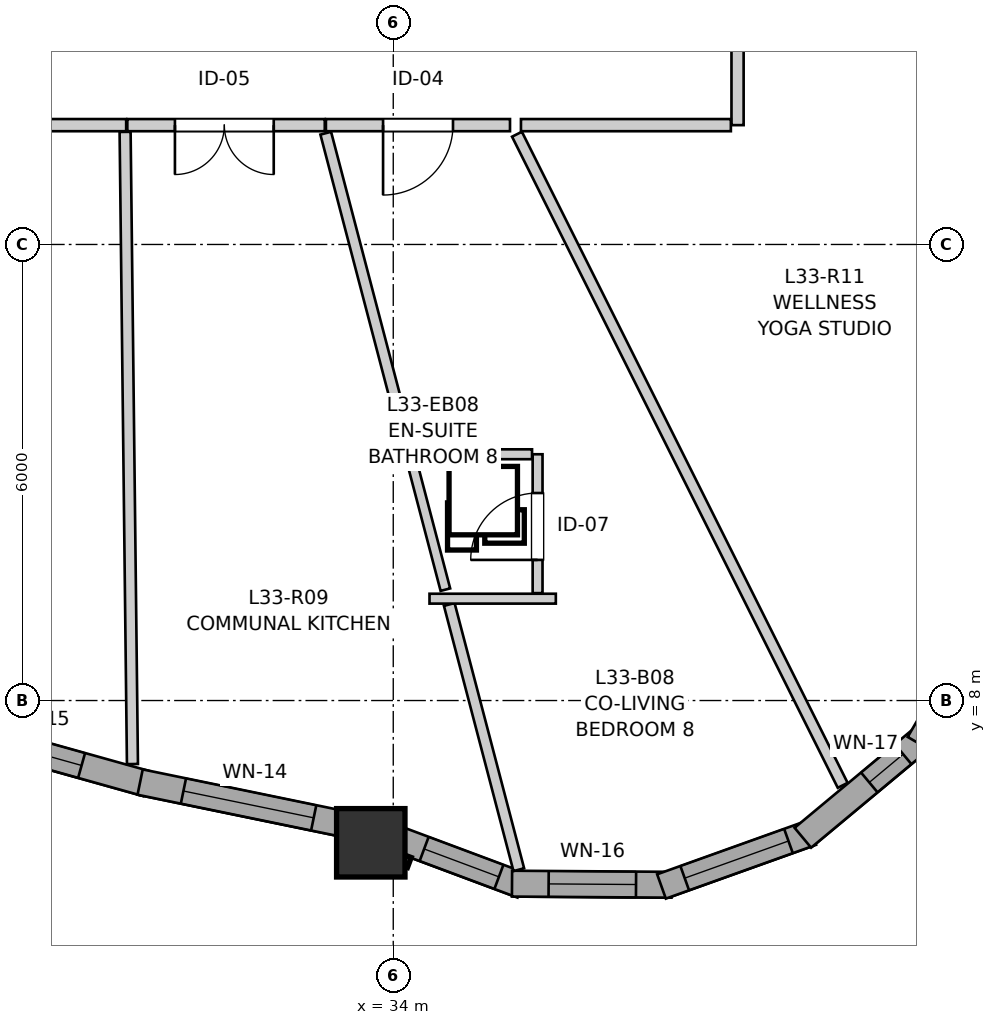
"""IFC4 building model, lengths in metres.
Left out: names, types, materials, properties, quantities, classifications, styles, units other than length and angle.
Written with IfcOpenShell. Run it as: python <this file> out.ifc"""

import sys

from ifc_helpers import new_model, si_unit, direction, frame, frame_2d, origin, origin_2d, place, context, subcontext, project, spatial, rectangle, extrude, source, transform, mapped, element, fill, save


model = new_model("IFC4")
c1 = context("Model", 3, precision=1e-05, world=origin(), true_north=direction((0.0, 1.0)))
c2 = subcontext(c1, "Body", "Model", "MODEL_VIEW")
j1 = project(units=[si_unit("LENGTHUNIT", "METRE"), si_unit("PLANEANGLEUNIT", "RADIAN")], contexts=[c1])
p1 = place(None, origin())
s1 = spatial("IfcSite", under=j1, at=p1, CompositionType="ELEMENT")
p2 = place(p1, origin())
s2 = spatial("IfcBuilding", under=s1, at=p2, CompositionType="ELEMENT")
p3 = place(p2, frame((0.0, 0.0, 112.0)))
s3 = spatial("IfcBuildingStorey", under=s2, at=p3, CompositionType="ELEMENT", Elevation=112.0)
m1 = source(origin(), c2, "Body", "SweptSolid", [
    extrude(rectangle(XDim=0.9, YDim=0.9, at=origin_2d()), origin(), (0.0, 0.0, 1.0), 2.935),
])
p4 = place(p3, frame((33.704, 6.128, 0.0), z_axis=(0.0, 0.0, 1.0), x_axis=(1.0, 0.0, 0.0)))
e1 = element("IfcColumn", 1, at=p4, inside=s3, PredefinedType="COLUMN", context=c2, shape_type="MappedRepresentation", body=[
    mapped(m1, transform((0.0, 0.0, 0.0), x_axis=(1.0, 0.0, 0.0), y_axis=(0.0, 1.0, 0.0), z_axis=(0.0, 0.0, 1.0), scale=1.0)),
])
p5 = place(p3, frame((27.819, 7.728, 0.0), z_axis=(0.0, 0.0, 1.0), x_axis=(0.963032186905, -0.269386352632, 0.0)))
e2 = element("IfcWall", 2, at=p5, inside=s3, PredefinedType="SOLIDWALL", context=c2, shape_type="SweptSolid", body=[
    extrude(rectangle(XDim=3.049, YDim=0.34, at=frame_2d((1.524, 0.0))), origin(), (0.0, 0.0, 1.0), 2.465),
])
p6 = place(p5, frame((0.71, 0.0, 0.82)))
e3 = element("IfcOpeningElement", 3, at=p6, cuts=e2, PredefinedType="OPENING", context=c2, shape_type="SweptSolid", body=[
    extrude(rectangle(XDim=1.45, YDim=1.25, at=frame_2d((0.725, 0.625))), frame((0.0, 0.18, 0.0), z_axis=(0.0, -1.0, 0.0), x_axis=(1.0, 0.0, 0.0)), (0.0, 0.0, 1.0), 0.36),
])
p7 = place(p3, frame((30.67, 6.927, 0.0), z_axis=(0.0, 0.0, 1.0), x_axis=(0.979422345081, -0.201821381317, 0.0)))
e4 = element("IfcWall", 4, at=p7, inside=s3, PredefinedType="SOLIDWALL", context=c2, shape_type="SweptSolid", body=[
    extrude(rectangle(XDim=2.903, YDim=0.34, at=frame_2d((1.452, 0.0))), origin(), (0.0, 0.0, 1.0), 2.465),
])
p8 = place(p7, frame((0.582, 0.0, 0.82)))
e5 = element("IfcOpeningElement", 5, at=p8, cuts=e4, PredefinedType="OPENING", context=c2, shape_type="SweptSolid", body=[
    extrude(rectangle(XDim=1.75, YDim=1.3, at=frame_2d((0.875, 0.65))), frame((0.0, 0.18, 0.0), z_axis=(0.0, -1.0, 0.0), x_axis=(1.0, 0.0, 0.0)), (0.0, 0.0, 1.0), 0.36),
])
p9 = place(p3, frame((33.979, 6.207, 0.0), z_axis=(0.0, 0.0, 1.0), x_axis=(0.936799566991, -0.349866504951, 0.0)))
e6 = element("IfcWall", 6, at=p9, inside=s3, PredefinedType="SOLIDWALL", context=c2, shape_type="SweptSolid", body=[
    extrude(rectangle(XDim=1.831, YDim=0.34, at=frame_2d((0.916, 0.0))), origin(), (0.0, 0.0, 1.0), 2.465),
])
p10 = place(p9, frame((0.456, 0.0, 0.82)))
e7 = element("IfcOpeningElement", 7, at=p10, cuts=e6, PredefinedType="OPENING", context=c2, shape_type="SweptSolid", body=[
    extrude(rectangle(XDim=1.05, YDim=1.45, at=frame_2d((0.525, 0.725))), frame((0.0, 0.18, 0.0), z_axis=(0.0, -1.0, 0.0), x_axis=(1.0, 0.0, 0.0)), (0.0, 0.0, 1.0), 0.36),
])
p11 = place(p3, frame((35.562, 5.591, 0.0), z_axis=(0.0, 0.0, 1.0), x_axis=(0.999976456891, -0.00686189939, 0.0)))
e8 = element("IfcWall", 8, at=p11, inside=s3, PredefinedType="SOLIDWALL", context=c2, shape_type="SweptSolid", body=[
    extrude(rectangle(XDim=2.099, YDim=0.34, at=frame_2d((1.05, 0.0))), origin(), (0.0, 0.0, 1.0), 2.465),
])
p12 = place(p11, frame((0.482, 0.0, 0.82)))
e9 = element("IfcOpeningElement", 9, at=p12, cuts=e8, PredefinedType="OPENING", context=c2, shape_type="SweptSolid", body=[
    extrude(rectangle(XDim=1.15, YDim=1.2, at=frame_2d((0.575, 0.6))), frame((0.0, 0.18, 0.0), z_axis=(0.0, -1.0, 0.0), x_axis=(1.0, 0.0, 0.0)), (0.0, 0.0, 1.0), 0.36),
])
p13 = place(p3, frame((37.529, 5.554, 0.0), z_axis=(0.0, 0.0, 1.0), x_axis=(0.941486401639, 0.33705096874, 0.0)))
e10 = element("IfcWall", 10, at=p13, inside=s3, PredefinedType="SOLIDWALL", context=c2, shape_type="SweptSolid", body=[
    extrude(rectangle(XDim=2.099, YDim=0.34, at=frame_2d((1.05, 0.0))), origin(), (0.0, 0.0, 1.0), 2.465),
])
p14 = place(p13, frame((0.324, 0.0, 0.82)))
e11 = element("IfcOpeningElement", 11, at=p14, cuts=e10, PredefinedType="OPENING", context=c2, shape_type="SweptSolid", body=[
    extrude(rectangle(XDim=1.45, YDim=1.25, at=frame_2d((0.725, 0.625))), frame((0.0, 0.18, 0.0), z_axis=(0.0, -1.0, 0.0), x_axis=(1.0, 0.0, 0.0)), (0.0, 0.0, 1.0), 0.36),
])
p15 = place(p3, frame((39.389, 6.195, 0.0), z_axis=(0.0, 0.0, 1.0), x_axis=(0.768488123124, 0.639864051669, 0.0)))
e12 = element("IfcWall", 12, at=p15, inside=s3, PredefinedType="SOLIDWALL", context=c2, shape_type="SweptSolid", body=[
    extrude(rectangle(XDim=2.099, YDim=0.34, at=frame_2d((1.05, 0.0))), origin(), (0.0, 0.0, 1.0), 2.465),
])
p16 = place(p15, frame((1.138, 0.0, 0.82)))
e13 = element("IfcOpeningElement", 13, at=p16, cuts=e12, PredefinedType="OPENING", context=c2, shape_type="SweptSolid", body=[
    extrude(rectangle(XDim=0.58, YDim=1.35, at=frame_2d((0.29, 0.675))), frame((0.0, 0.18, 0.0), z_axis=(0.0, -1.0, 0.0), x_axis=(1.0, 0.0, 0.0)), (0.0, 0.0, 1.0), 0.36),
])
p17 = place(p3, frame((40.916, 7.435, 0.0), z_axis=(0.0, 0.0, 1.0), x_axis=(0.501989603552, 0.864873654313, 0.0)))
e14 = element("IfcWall", 14, at=p17, inside=s3, PredefinedType="SOLIDWALL", context=c2, shape_type="SweptSolid", body=[
    extrude(rectangle(XDim=2.099, YDim=0.34, at=frame_2d((1.05, 0.0))), origin(), (0.0, 0.0, 1.0), 2.465),
])
p18 = place(p17, frame((0.3, 0.0, 0.82)))
e15 = element("IfcOpeningElement", 15, at=p18, cuts=e14, PredefinedType="OPENING", context=c2, shape_type="SweptSolid", body=[
    extrude(rectangle(XDim=1.5, YDim=1.45, at=frame_2d((0.75, 0.725))), frame((0.0, 0.18, 0.0), z_axis=(0.0, -1.0, 0.0), x_axis=(1.0, 0.0, 0.0)), (0.0, 0.0, 1.0), 0.36),
])
p19 = place(p3, frame((30.486, 15.57, 0.0), z_axis=(0.0, 0.0, 1.0), x_axis=(-1.0, 0.0, 0.0)))
e16 = element("IfcWall", 16, at=p19, inside=s3, PredefinedType="PARTITIONING", context=c2, shape_type="SweptSolid", body=[
    extrude(rectangle(XDim=6.725, YDim=0.16, at=frame_2d((3.363, 0.0))), origin(), (0.0, 0.0, 1.0), 2.935),
])
p20 = place(p19, frame((2.711, 0.0, 0.0)))
e17 = element("IfcOpeningElement", 17, at=p20, cuts=e16, PredefinedType="OPENING", context=c2, shape_type="SweptSolid", body=[
    extrude(rectangle(XDim=1.3, YDim=2.1, at=frame_2d((0.65, 1.05))), frame((0.0, 0.09, 0.0), z_axis=(0.0, -1.0, 0.0), x_axis=(1.0, 0.0, 0.0)), (0.0, 0.0, 1.0), 0.18),
])
p21 = place(p3, frame((38.53, 21.863, 0.0), z_axis=(0.0, 0.0, 1.0), x_axis=(0.0, -1.0, 0.0)))
e18 = element("IfcWall", 18, at=p21, inside=s3, PredefinedType="PARTITIONING", context=c2, shape_type="SweptSolid", body=[
    extrude(rectangle(XDim=6.293, YDim=0.16, at=frame_2d((3.146, 0.0))), origin(), (0.0, 0.0, 1.0), 2.935),
])
p22 = place(p21, frame((2.675, 0.0, 0.0)))
e19 = element("IfcOpeningElement", 19, at=p22, cuts=e18, PredefinedType="OPENING", context=c2, shape_type="SweptSolid", body=[
    extrude(rectangle(XDim=0.96, YDim=2.1, at=frame_2d((0.48, 1.05))), frame((0.0, 0.09, 0.0), z_axis=(0.0, -1.0, 0.0), x_axis=(1.0, 0.0, 0.0)), (0.0, 0.0, 1.0), 0.18),
])
p23 = place(p3, frame((33.099, 15.57, 0.0), z_axis=(0.0, 0.0, 1.0), x_axis=(-1.0, 0.0, 0.0)))
e20 = element("IfcWall", 20, at=p23, inside=s3, PredefinedType="PARTITIONING", context=c2, shape_type="SweptSolid", body=[
    extrude(rectangle(XDim=2.598, YDim=0.16, at=frame_2d((1.299, 0.0))), origin(), (0.0, 0.0, 1.0), 2.935),
])
p24 = place(p23, frame((0.671, 0.0, 0.0)))
e21 = element("IfcOpeningElement", 21, at=p24, cuts=e20, PredefinedType="OPENING", context=c2, shape_type="SweptSolid", body=[
    extrude(rectangle(XDim=1.3, YDim=2.1, at=frame_2d((0.65, 1.05))), frame((0.0, 0.09, 0.0), z_axis=(0.0, -1.0, 0.0), x_axis=(1.0, 0.0, 0.0)), (0.0, 0.0, 1.0), 0.18),
])
p25 = place(p3, frame((35.536, 15.57, 0.0), z_axis=(0.0, 0.0, 1.0), x_axis=(-1.0, 0.0, 0.0)))
e22 = element("IfcWall", 22, at=p25, inside=s3, PredefinedType="PARTITIONING", context=c2, shape_type="SweptSolid", body=[
    extrude(rectangle(XDim=2.422, YDim=0.16, at=frame_2d((1.211, 0.0))), origin(), (0.0, 0.0, 1.0), 2.935),
])
p26 = place(p25, frame((0.75, 0.0, 0.0)))
e23 = element("IfcOpeningElement", 23, at=p26, cuts=e22, PredefinedType="OPENING", context=c2, shape_type="SweptSolid", body=[
    extrude(rectangle(XDim=0.92, YDim=2.1, at=frame_2d((0.46, 1.05))), frame((0.0, 0.09, 0.0), z_axis=(0.0, -1.0, 0.0), x_axis=(1.0, 0.0, 0.0)), (0.0, 0.0, 1.0), 0.18),
])
p27 = place(p3, frame((35.899, 9.413, 0.0), z_axis=(0.0, 0.0, 1.0), x_axis=(0.0, 1.0, 0.0)))
e24 = element("IfcWall", 24, at=p27, inside=s3, PredefinedType="PARTITIONING", context=c2, shape_type="SweptSolid", body=[
    extrude(rectangle(XDim=1.827, YDim=0.13, at=frame_2d((0.914, 0.0))), origin(), (0.0, 0.0, 1.0), 2.935),
])
p28 = place(p27, frame((0.437, 0.0, 0.0)))
e25 = element("IfcOpeningElement", 25, at=p28, cuts=e24, PredefinedType="OPENING", context=c2, shape_type="SweptSolid", body=[
    extrude(rectangle(XDim=0.88, YDim=2.05, at=frame_2d((0.44, 1.025))), frame((0.0, 0.075, 0.0), z_axis=(0.0, -1.0, 0.0), x_axis=(1.0, 0.0, 0.0)), (0.0, 0.0, 1.0), 0.15),
])
p29 = place(p3, frame((35.628, 15.45, 0.0), z_axis=(0.0, 0.0, 1.0), x_axis=(0.447427687311, -0.894320113062, 0.0)))
e26 = element("IfcWall", 26, at=p29, inside=s3, PredefinedType="PARTITIONING", context=c2, shape_type="SweptSolid", body=[
    extrude(rectangle(XDim=9.578, YDim=0.145, at=frame_2d((4.789, 0.0))), origin(), (0.0, 0.0, 1.0), 2.935),
])
p30 = place(p3, frame((30.472, 15.481, 0.0), z_axis=(0.0, 0.0, 1.0), x_axis=(0.011623708307, -0.999932442421, 0.0)))
e27 = element("IfcWall", 27, at=p30, inside=s3, PredefinedType="PARTITIONING", context=c2, shape_type="SweptSolid", body=[
    extrude(rectangle(XDim=8.317, YDim=0.145, at=frame_2d((4.159, 0.0))), origin(), (0.0, 0.0, 1.0), 2.935),
])
p31 = place(p3, frame((33.112, 15.464, 0.0), z_axis=(0.0, 0.0, 1.0), x_axis=(0.253558008984, -0.967320182814, 0.0)))
e28 = element("IfcWall", 28, at=p31, inside=s3, PredefinedType="PARTITIONING", context=c2, shape_type="SweptSolid", body=[
    extrude(rectangle(XDim=4.382, YDim=0.145, at=frame_2d((2.191, 0.0))), origin(), (0.0, 0.0, 1.0), 2.935),
])
p32 = place(p3, frame((34.737, 9.264, 0.0), z_axis=(0.0, 0.0, 1.0), x_axis=(0.253650405993, -0.967295958608, 0.0)))
e29 = element("IfcWall", 29, at=p32, inside=s3, PredefinedType="PARTITIONING", context=c2, shape_type="SweptSolid", body=[
    extrude(rectangle(XDim=3.607, YDim=0.145, at=frame_2d((1.804, 0.0))), origin(), (0.0, 0.0, 1.0), 2.935),
])
p33 = place(p3, frame((35.68, 15.57, 0.0), z_axis=(0.0, 0.0, 1.0), x_axis=(1.0, 0.0, 0.0)))
e30 = element("IfcWall", 30, at=p33, inside=s3, PredefinedType="PARTITIONING", context=c2, shape_type="SweptSolid", body=[
    extrude(rectangle(XDim=2.762, YDim=0.16, at=frame_2d((1.381, 0.0))), origin(), (0.0, 0.0, 1.0), 2.935),
])
p34 = place(p3, frame((34.227, 11.21, 0.0), z_axis=(0.0, 0.0, 1.0), x_axis=(0.2534645297, -0.967344681168, 0.0)))
e31 = element("IfcWall", 31, at=p34, inside=s3, PredefinedType="PARTITIONING", context=c2, shape_type="SweptSolid", body=[
    extrude(rectangle(XDim=1.811, YDim=0.13, at=frame_2d((0.905, 0.0))), origin(), (0.0, 0.0, 1.0), 2.935),
])
p35 = place(p3, frame((34.319, 11.24, 0.0), z_axis=(0.0, 0.0, 1.0), x_axis=(1.0, 0.0, 0.0)))
e32 = element("IfcWall", 32, at=p35, inside=s3, PredefinedType="PARTITIONING", context=c2, shape_type="SweptSolid", body=[
    extrude(rectangle(XDim=1.507, YDim=0.13, at=frame_2d((0.753, 0.0))), origin(), (0.0, 0.0, 1.0), 2.935),
])
p36 = place(p3, frame((34.477, 9.34, 0.0), z_axis=(0.0, 0.0, 1.0), x_axis=(1.0, 0.0, 0.0)))
e33 = element("IfcWall", 33, at=p36, inside=s3, PredefinedType="PARTITIONING", context=c2, shape_type="SweptSolid", body=[
    extrude(rectangle(XDim=1.662, YDim=0.13, at=frame_2d((0.831, 0.0))), origin(), (0.0, 0.0, 1.0), 2.935),
])
m2 = source(origin(), c2, "Body", "SweptSolid", [
    extrude(rectangle(XDim=1.45, YDim=1.25, at=frame_2d((0.725, 0.625))), frame((0.0, 0.03, 0.0), z_axis=(0.0, -1.0, 0.0), x_axis=(1.0, 0.0, 0.0)), (0.0, 0.0, 1.0), 0.06),
])
p37 = place(p6, origin())
e34 = element("IfcWindow", 34, at=p37, inside=s3, PartitioningType="SINGLE_PANEL", PredefinedType="WINDOW", context=c2, shape_type="MappedRepresentation", body=[
    mapped(m2, transform((0.0, 0.0, 0.0), x_axis=(1.0, 0.0, 0.0), y_axis=(0.0, 1.0, 0.0), z_axis=(0.0, 0.0, 1.0), scale=1.0)),
])
fill(e3, e34)
m3 = source(origin(), c2, "Body", "SweptSolid", [
    extrude(rectangle(XDim=1.75, YDim=1.3, at=frame_2d((0.875, 0.65))), frame((0.0, 0.03, 0.0), z_axis=(0.0, -1.0, 0.0), x_axis=(1.0, 0.0, 0.0)), (0.0, 0.0, 1.0), 0.06),
])
p38 = place(p8, origin())
e35 = element("IfcWindow", 35, at=p38, inside=s3, PartitioningType="SINGLE_PANEL", PredefinedType="WINDOW", context=c2, shape_type="MappedRepresentation", body=[
    mapped(m3, transform((0.0, 0.0, 0.0), x_axis=(1.0, 0.0, 0.0), y_axis=(0.0, 1.0, 0.0), z_axis=(0.0, 0.0, 1.0), scale=1.0)),
])
fill(e5, e35)
m4 = source(origin(), c2, "Body", "SweptSolid", [
    extrude(rectangle(XDim=1.05, YDim=1.45, at=frame_2d((0.525, 0.725))), frame((0.0, 0.03, 0.0), z_axis=(0.0, -1.0, 0.0), x_axis=(1.0, 0.0, 0.0)), (0.0, 0.0, 1.0), 0.06),
])
p39 = place(p10, origin())
e36 = element("IfcWindow", 36, at=p39, inside=s3, PartitioningType="SINGLE_PANEL", PredefinedType="WINDOW", context=c2, shape_type="MappedRepresentation", body=[
    mapped(m4, transform((0.0, 0.0, 0.0), x_axis=(1.0, 0.0, 0.0), y_axis=(0.0, 1.0, 0.0), z_axis=(0.0, 0.0, 1.0), scale=1.0)),
])
fill(e7, e36)
m5 = source(origin(), c2, "Body", "SweptSolid", [
    extrude(rectangle(XDim=1.15, YDim=1.2, at=frame_2d((0.575, 0.6))), frame((0.0, 0.03, 0.0), z_axis=(0.0, -1.0, 0.0), x_axis=(1.0, 0.0, 0.0)), (0.0, 0.0, 1.0), 0.06),
])
p40 = place(p12, origin())
e37 = element("IfcWindow", 37, at=p40, inside=s3, PartitioningType="SINGLE_PANEL", PredefinedType="WINDOW", context=c2, shape_type="MappedRepresentation", body=[
    mapped(m5, transform((0.0, 0.0, 0.0), x_axis=(1.0, 0.0, 0.0), y_axis=(0.0, 1.0, 0.0), z_axis=(0.0, 0.0, 1.0), scale=1.0)),
])
fill(e9, e37)
p41 = place(p14, origin())
e38 = element("IfcWindow", 38, at=p41, inside=s3, PartitioningType="SINGLE_PANEL", PredefinedType="WINDOW", context=c2, shape_type="MappedRepresentation", body=[
    mapped(m2, transform((0.0, 0.0, 0.0), x_axis=(1.0, 0.0, 0.0), y_axis=(0.0, 1.0, 0.0), z_axis=(0.0, 0.0, 1.0), scale=1.0)),
])
fill(e11, e38)
m6 = source(origin(), c2, "Body", "SweptSolid", [
    extrude(rectangle(XDim=0.58, YDim=1.35, at=frame_2d((0.29, 0.675))), frame((0.0, 0.03, 0.0), z_axis=(0.0, -1.0, 0.0), x_axis=(1.0, 0.0, 0.0)), (0.0, 0.0, 1.0), 0.06),
])
p42 = place(p16, origin())
e39 = element("IfcWindow", 39, at=p42, inside=s3, PartitioningType="SINGLE_PANEL", PredefinedType="WINDOW", context=c2, shape_type="MappedRepresentation", body=[
    mapped(m6, transform((0.0, 0.0, 0.0), x_axis=(1.0, 0.0, 0.0), y_axis=(0.0, 1.0, 0.0), z_axis=(0.0, 0.0, 1.0), scale=1.0)),
])
fill(e13, e39)
m7 = source(origin(), c2, "Body", "SweptSolid", [
    extrude(rectangle(XDim=1.3, YDim=2.1, at=frame_2d((0.65, 1.05))), frame((0.0, 0.025, 0.0), z_axis=(0.0, -1.0, 0.0), x_axis=(1.0, 0.0, 0.0)), (0.0, 0.0, 1.0), 0.05),
])
p43 = place(p24, origin())
e40 = element("IfcDoor", 40, at=p43, inside=s3, OperationType="DOUBLE_DOOR_SINGLE_SWING", PredefinedType="DOOR", context=c2, shape_type="MappedRepresentation", body=[
    mapped(m7, transform((0.0, 0.0, 0.0), x_axis=(1.0, 0.0, 0.0), y_axis=(0.0, 1.0, 0.0), z_axis=(0.0, 0.0, 1.0), scale=1.0)),
])
fill(e21, e40)
m8 = source(origin(), c2, "Body", "SweptSolid", [
    extrude(rectangle(XDim=0.92, YDim=2.1, at=frame_2d((0.46, 1.05))), frame((0.0, 0.025, 0.0), z_axis=(0.0, -1.0, 0.0), x_axis=(1.0, 0.0, 0.0)), (0.0, 0.0, 1.0), 0.05),
])
p44 = place(p26, origin())
e41 = element("IfcDoor", 41, at=p44, inside=s3, OperationType="SINGLE_SWING_RIGHT", PredefinedType="DOOR", context=c2, shape_type="MappedRepresentation", body=[
    mapped(m8, transform((0.0, 0.0, 0.0), x_axis=(1.0, 0.0, 0.0), y_axis=(0.0, 1.0, 0.0), z_axis=(0.0, 0.0, 1.0), scale=1.0)),
])
fill(e23, e41)
m9 = source(origin(), c2, "Body", "SweptSolid", [
    extrude(rectangle(XDim=0.88, YDim=2.05, at=frame_2d((0.44, 1.025))), frame((0.0, 0.025, 0.0), z_axis=(0.0, -1.0, 0.0), x_axis=(1.0, 0.0, 0.0)), (0.0, 0.0, 1.0), 0.05),
])
p45 = place(p28, origin())
e42 = element("IfcDoor", 42, at=p45, inside=s3, OperationType="SINGLE_SWING_LEFT", PredefinedType="DOOR", context=c2, shape_type="MappedRepresentation", body=[
    mapped(m9, transform((0.0, 0.0, 0.0), x_axis=(1.0, 0.0, 0.0), y_axis=(0.0, 1.0, 0.0), z_axis=(0.0, 0.0, 1.0), scale=1.0)),
])
fill(e25, e42)
save(model, sys.argv[1])
